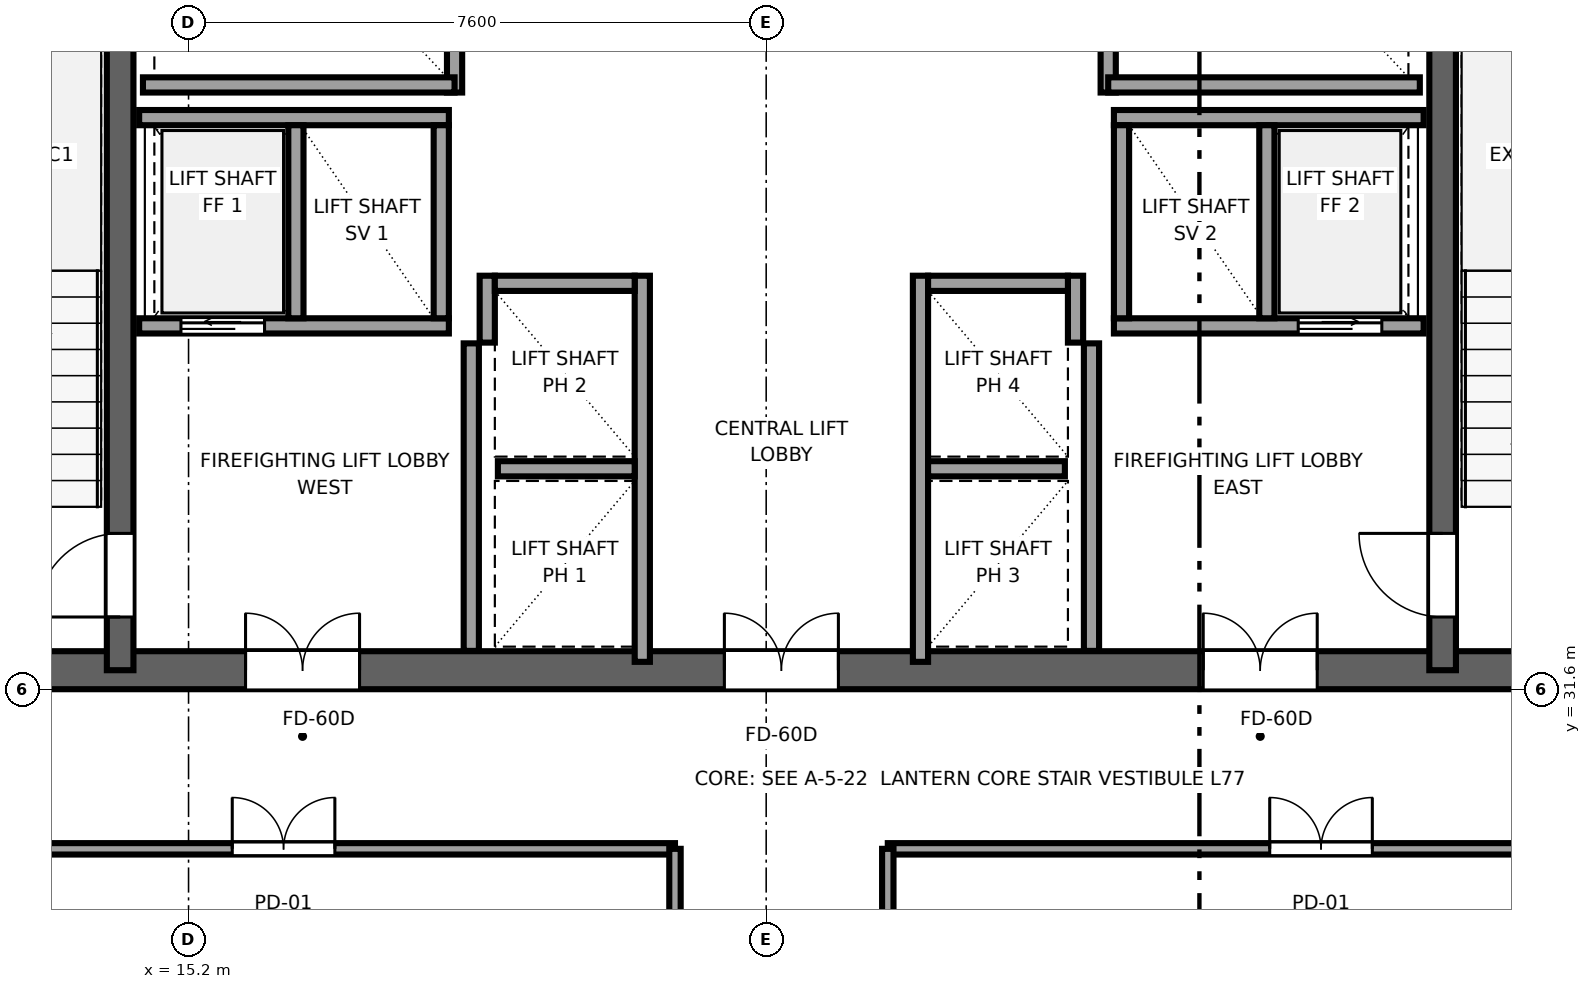
"""IFC4 building model, lengths in metres.
Left out: names, types, materials, properties, quantities, classifications, styles, units other than length and angle.
Written with IfcOpenShell. Run it as: python <this file> out.ifc"""

import sys

from ifc_helpers import new_model, si_unit, direction, frame, frame_2d, origin, place, context, subcontext, project, spatial, rectangle, extrude, source, transform, mapped, element, fill, save


model = new_model("IFC4")
c1 = context("Model", 3, precision=1e-05, world=origin(), true_north=direction((0.0, 1.0)))
c2 = subcontext(c1, "Body", "Model", "MODEL_VIEW")
j1 = project(units=[si_unit("LENGTHUNIT", "METRE"), si_unit("PLANEANGLEUNIT", "RADIAN")], contexts=[c1])
p1 = place(None, origin())
s1 = spatial("IfcSite", under=j1, at=p1, CompositionType="ELEMENT")
p2 = place(p1, origin())
s2 = spatial("IfcBuilding", under=s1, at=p2, CompositionType="ELEMENT")
p3 = place(p2, frame((0.0, 0.0, 290.95)))
s3 = spatial("IfcBuildingStorey", under=s2, at=p3, CompositionType="ELEMENT", Elevation=290.95)
p4 = place(p3, frame((10.0, 31.85, 0.0), z_axis=(0.0, 0.0, 1.0), x_axis=(1.0, 0.0, 0.0)))
e1 = element("IfcWall", 1, at=p4, inside=s3, PredefinedType="SHEAR", context=c2, shape_type="SweptSolid", body=[
    extrude(rectangle(XDim=26.0, YDim=0.5, at=frame_2d((13.0, 0.0))), origin(), (0.0, 0.0, 1.0), 3.8),
])
p5 = place(p4, frame((7.45, 0.0, 0.0), z_axis=(0.0, 0.0, 1.0), x_axis=(-1.0, 0.0, 0.0)))
e2 = element("IfcOpeningElement", 2, at=p5, cuts=e1, PredefinedType="OPENING", context=c2, shape_type="SweptSolid", body=[
    extrude(rectangle(XDim=1.5, YDim=2.04, at=frame_2d((0.75, 1.02))), frame((0.0, 0.26, 0.0), z_axis=(0.0, -1.0, 0.0), x_axis=(1.0, 0.0, 0.0)), (0.0, 0.0, 1.0), 0.52),
])
p6 = place(p4, frame((13.75, 0.0, 0.0), z_axis=(0.0, 0.0, 1.0), x_axis=(-1.0, 0.0, 0.0)))
e3 = element("IfcOpeningElement", 3, at=p6, cuts=e1, PredefinedType="OPENING", context=c2, shape_type="SweptSolid", body=[
    extrude(rectangle(XDim=1.5, YDim=2.04, at=frame_2d((0.75, 1.02))), frame((0.0, 0.26, 0.0), z_axis=(0.0, -1.0, 0.0), x_axis=(1.0, 0.0, 0.0)), (0.0, 0.0, 1.0), 0.52),
])
p7 = place(p4, frame((20.05, 0.0, 0.0), z_axis=(0.0, 0.0, 1.0), x_axis=(-1.0, 0.0, 0.0)))
e4 = element("IfcOpeningElement", 4, at=p7, cuts=e1, PredefinedType="OPENING", context=c2, shape_type="SweptSolid", body=[
    extrude(rectangle(XDim=1.5, YDim=2.04, at=frame_2d((0.75, 1.02))), frame((0.0, 0.26, 0.0), z_axis=(0.0, -1.0, 0.0), x_axis=(1.0, 0.0, 0.0)), (0.0, 0.0, 1.0), 0.52),
])
p8 = place(p3, frame((14.3, 31.85, 0.0), z_axis=(0.0, 0.0, 1.0), x_axis=(0.0, 1.0, 0.0)))
e5 = element("IfcWall", 5, at=p8, inside=s3, PredefinedType="SHEAR", context=c2, shape_type="SweptSolid", body=[
    extrude(rectangle(XDim=12.1, YDim=0.35, at=frame_2d((6.05, 0.0))), origin(), (0.0, 0.0, 1.0), 3.8),
])
p9 = place(p8, frame((0.7, 0.0, 0.0)))
e6 = element("IfcOpeningElement", 6, at=p9, cuts=e5, PredefinedType="OPENING", context=c2, shape_type="SweptSolid", body=[
    extrude(rectangle(XDim=1.1, YDim=2.12, at=frame_2d((0.55, 1.06))), frame((0.0, 0.185, 0.0), z_axis=(0.0, -1.0, 0.0), x_axis=(1.0, 0.0, 0.0)), (0.0, 0.0, 1.0), 0.37),
])
p10 = place(p3, frame((31.7, 31.85, 0.0), z_axis=(0.0, 0.0, 1.0), x_axis=(0.0, 1.0, 0.0)))
e7 = element("IfcWall", 7, at=p10, inside=s3, PredefinedType="SHEAR", context=c2, shape_type="SweptSolid", body=[
    extrude(rectangle(XDim=12.1, YDim=0.35, at=frame_2d((6.05, 0.0))), origin(), (0.0, 0.0, 1.0), 3.8),
])
p11 = place(p10, frame((1.8, 0.0, 0.0), z_axis=(0.0, 0.0, 1.0), x_axis=(-1.0, 0.0, 0.0)))
e8 = element("IfcOpeningElement", 8, at=p11, cuts=e7, PredefinedType="OPENING", context=c2, shape_type="SweptSolid", body=[
    extrude(rectangle(XDim=1.1, YDim=2.12, at=frame_2d((0.55, 1.06))), frame((0.0, 0.185, 0.0), z_axis=(0.0, -1.0, 0.0), x_axis=(1.0, 0.0, 0.0)), (0.0, 0.0, 1.0), 0.37),
])
p12 = place(p3, frame((18.7, 39.45, 0.0), z_axis=(0.0, 0.0, 1.0), x_axis=(0.0, 1.0, 0.0)))
e9 = element("IfcWall", 9, at=p12, inside=s3, PredefinedType="SOLIDWALL", context=c2, shape_type="SweptSolid", body=[
    extrude(rectangle(XDim=4.4, YDim=0.2, at=frame_2d((2.2, 0.0))), origin(), (0.0, 0.0, 1.0), 3.58),
])
p13 = place(p3, frame((14.6, 39.55, 0.0), z_axis=(0.0, 0.0, 1.0), x_axis=(1.0, 0.0, 0.0)))
e10 = element("IfcWall", 10, at=p13, inside=s3, PredefinedType="SOLIDWALL", context=c2, shape_type="SweptSolid", body=[
    extrude(rectangle(XDim=4.1, YDim=0.2, at=frame_2d((2.05, 0.0))), origin(), (0.0, 0.0, 1.0), 3.58),
])
p14 = place(p3, frame((27.3, 39.45, 0.0), z_axis=(0.0, 0.0, 1.0), x_axis=(0.0, 1.0, 0.0)))
e11 = element("IfcWall", 11, at=p14, inside=s3, PredefinedType="SOLIDWALL", context=c2, shape_type="SweptSolid", body=[
    extrude(rectangle(XDim=4.4, YDim=0.2, at=frame_2d((2.2, 0.0))), origin(), (0.0, 0.0, 1.0), 3.58),
])
p15 = place(p3, frame((27.3, 39.55, 0.0), z_axis=(0.0, 0.0, 1.0), x_axis=(1.0, 0.0, 0.0)))
e12 = element("IfcWall", 12, at=p15, inside=s3, PredefinedType="SOLIDWALL", context=c2, shape_type="SweptSolid", body=[
    extrude(rectangle(XDim=4.1, YDim=0.2, at=frame_2d((2.05, 0.0))), origin(), (0.0, 0.0, 1.0), 3.58),
])
for number, where, z_axis, x_axis in (
    (13, (18.92, 32.104, 0.0), (0.0, 0.0, 1.0), (0.0, 1.0, 0.0)),
    (14, (27.08, 32.104, 0.0), (0.0, 0.0, 1.0), (0.0, 1.0, 0.0)),
):
    element("IfcWall", number, at=place(p3, frame(where, z_axis=z_axis, x_axis=x_axis)), inside=s3, PredefinedType="SOLIDWALL", context=c2, shape_type="SweptSolid", body=[
        extrude(rectangle(XDim=4.046, YDim=0.2, at=frame_2d((2.023, 0.0))), origin(), (0.0, 0.0, 1.0), 3.58),
    ])
p16 = place(p3, frame((21.17, 31.96, 0.0), z_axis=(0.0, 0.0, 1.0), x_axis=(0.0, 1.0, 0.0)))
e15 = element("IfcWall", 15, at=p16, inside=s3, PredefinedType="SOLIDWALL", context=c2, shape_type="SweptSolid", body=[
    extrude(rectangle(XDim=5.08, YDim=0.2, at=frame_2d((2.54, 0.0))), origin(), (0.0, 0.0, 1.0), 3.58),
])
p17 = place(p3, frame((19.13, 36.16, 0.0), z_axis=(0.0, 0.0, 1.0), x_axis=(0.0, 1.0, 0.0)))
e16 = element("IfcWall", 16, at=p17, inside=s3, PredefinedType="SOLIDWALL", context=c2, shape_type="SweptSolid", body=[
    extrude(rectangle(XDim=0.88, YDim=0.2, at=frame_2d((0.44, 0.0))), origin(), (0.0, 0.0, 1.0), 3.58),
])
p18 = place(p3, frame((19.23, 36.94, 0.0), z_axis=(0.0, 0.0, 1.0), x_axis=(1.0, 0.0, 0.0)))
e17 = element("IfcWall", 17, at=p18, inside=s3, PredefinedType="SOLIDWALL", context=c2, shape_type="SweptSolid", body=[
    extrude(rectangle(XDim=1.84, YDim=0.2, at=frame_2d((0.92, 0.0))), origin(), (0.0, 0.0, 1.0), 3.58),
])
p19 = place(p3, frame((19.27, 34.5, 0.0), z_axis=(0.0, 0.0, 1.0), x_axis=(1.0, 0.0, 0.0)))
e18 = element("IfcWall", 18, at=p19, inside=s3, PredefinedType="SOLIDWALL", context=c2, shape_type="SweptSolid", body=[
    extrude(rectangle(XDim=1.8, YDim=0.2, at=frame_2d((0.9, 0.0))), origin(), (0.0, 0.0, 1.0), 3.58),
])
p20 = place(p3, frame((27.375, 36.38, 0.0), z_axis=(0.0, 0.0, 1.0), x_axis=(1.0, 0.0, 0.0)))
e19 = element("IfcWall", 19, at=p20, inside=s3, PredefinedType="SOLIDWALL", context=c2, shape_type="SweptSolid", body=[
    extrude(rectangle(XDim=4.075, YDim=0.2, at=frame_2d((2.038, 0.0))), origin(), (0.0, 0.0, 1.0), 3.58),
])
p21 = place(p20, frame((2.425, 0.0, 0.0)))
e20 = element("IfcOpeningElement", 20, at=p21, cuts=e19, PredefinedType="OPENING", context=c2, shape_type="SweptSolid", body=[
    extrude(rectangle(XDim=1.1, YDim=2.12, at=frame_2d((0.55, 1.06))), frame((0.0, 0.11, 0.0), z_axis=(0.0, -1.0, 0.0), x_axis=(1.0, 0.0, 0.0)), (0.0, 0.0, 1.0), 0.22),
])
p22 = place(p3, frame((27.375, 39.12, 0.0), z_axis=(0.0, 0.0, 1.0), x_axis=(1.0, 0.0, 0.0)))
e21 = element("IfcWall", 21, at=p22, inside=s3, PredefinedType="SOLIDWALL", context=c2, shape_type="SweptSolid", body=[
    extrude(rectangle(XDim=4.075, YDim=0.2, at=frame_2d((2.038, 0.0))), origin(), (0.0, 0.0, 1.0), 3.58),
])
for number, where, z_axis, x_axis in (
    (22, (27.475, 36.48, 0.0), (0.0, 0.0, 1.0), (0.0, 1.0, 0.0)),
    (23, (29.387, 36.48, 0.0), (0.0, 0.0, 1.0), (0.0, 1.0, 0.0)),
):
    element("IfcWall", number, at=place(p3, frame(where, z_axis=z_axis, x_axis=x_axis)), inside=s3, PredefinedType="SOLIDWALL", context=c2, shape_type="SweptSolid", body=[
        extrude(rectangle(XDim=2.54, YDim=0.2, at=frame_2d((1.27, 0.0))), origin(), (0.0, 0.0, 1.0), 3.58),
    ])
p23 = place(p3, frame((14.55, 36.38, 0.0), z_axis=(0.0, 0.0, 1.0), x_axis=(1.0, 0.0, 0.0)))
e24 = element("IfcWall", 24, at=p23, inside=s3, PredefinedType="SOLIDWALL", context=c2, shape_type="SweptSolid", body=[
    extrude(rectangle(XDim=4.075, YDim=0.2, at=frame_2d((2.038, 0.0))), origin(), (0.0, 0.0, 1.0), 3.58),
])
p24 = place(p23, frame((0.55, 0.0, 0.0)))
e25 = element("IfcOpeningElement", 25, at=p24, cuts=e24, PredefinedType="OPENING", context=c2, shape_type="SweptSolid", body=[
    extrude(rectangle(XDim=1.1, YDim=2.12, at=frame_2d((0.55, 1.06))), frame((0.0, 0.11, 0.0), z_axis=(0.0, -1.0, 0.0), x_axis=(1.0, 0.0, 0.0)), (0.0, 0.0, 1.0), 0.22),
])
p25 = place(p3, frame((14.55, 39.12, 0.0), z_axis=(0.0, 0.0, 1.0), x_axis=(1.0, 0.0, 0.0)))
e26 = element("IfcWall", 26, at=p25, inside=s3, PredefinedType="SOLIDWALL", context=c2, shape_type="SweptSolid", body=[
    extrude(rectangle(XDim=4.075, YDim=0.2, at=frame_2d((2.038, 0.0))), origin(), (0.0, 0.0, 1.0), 3.58),
])
for number, where, z_axis, x_axis in (
    (27, (18.525, 36.48, 0.0), (0.0, 0.0, 1.0), (0.0, 1.0, 0.0)),
    (28, (16.613, 36.48, 0.0), (0.0, 0.0, 1.0), (0.0, 1.0, 0.0)),
):
    element("IfcWall", number, at=place(p3, frame(where, z_axis=z_axis, x_axis=x_axis)), inside=s3, PredefinedType="SOLIDWALL", context=c2, shape_type="SweptSolid", body=[
        extrude(rectangle(XDim=2.54, YDim=0.2, at=frame_2d((1.27, 0.0))), origin(), (0.0, 0.0, 1.0), 3.58),
    ])
p26 = place(p3, frame((24.83, 31.96, 0.0), z_axis=(0.0, 0.0, 1.0), x_axis=(0.0, 1.0, 0.0)))
e29 = element("IfcWall", 29, at=p26, inside=s3, PredefinedType="SOLIDWALL", context=c2, shape_type="SweptSolid", body=[
    extrude(rectangle(XDim=5.08, YDim=0.2, at=frame_2d((2.54, 0.0))), origin(), (0.0, 0.0, 1.0), 3.58),
])
p27 = place(p3, frame((26.87, 36.16, 0.0), z_axis=(0.0, 0.0, 1.0), x_axis=(0.0, 1.0, 0.0)))
e30 = element("IfcWall", 30, at=p27, inside=s3, PredefinedType="SOLIDWALL", context=c2, shape_type="SweptSolid", body=[
    extrude(rectangle(XDim=0.88, YDim=0.2, at=frame_2d((0.44, 0.0))), origin(), (0.0, 0.0, 1.0), 3.58),
])
p28 = place(p3, frame((24.93, 36.94, 0.0), z_axis=(0.0, 0.0, 1.0), x_axis=(1.0, 0.0, 0.0)))
e31 = element("IfcWall", 31, at=p28, inside=s3, PredefinedType="SOLIDWALL", context=c2, shape_type="SweptSolid", body=[
    extrude(rectangle(XDim=1.84, YDim=0.2, at=frame_2d((0.92, 0.0))), origin(), (0.0, 0.0, 1.0), 3.58),
])
p29 = place(p3, frame((24.93, 34.5, 0.0), z_axis=(0.0, 0.0, 1.0), x_axis=(1.0, 0.0, 0.0)))
e32 = element("IfcWall", 32, at=p29, inside=s3, PredefinedType="SOLIDWALL", context=c2, shape_type="SweptSolid", body=[
    extrude(rectangle(XDim=1.8, YDim=0.2, at=frame_2d((0.9, 0.0))), origin(), (0.0, 0.0, 1.0), 3.58),
])
p30 = place(p3, frame((11.3, 29.5, 0.0), z_axis=(0.0, 0.0, 1.0), x_axis=(1.0, 0.0, 0.0)))
e33 = element("IfcWall", 33, at=p30, inside=s3, PredefinedType="PARTITIONING", context=c2, shape_type="SweptSolid", body=[
    extrude(rectangle(XDim=10.3, YDim=0.15, at=frame_2d((5.15, 0.0))), origin(), (0.0, 0.0, 1.0), 3.58),
])
p31 = place(p30, frame((4.475, 0.0, 0.0)))
e34 = element("IfcOpeningElement", 34, at=p31, cuts=e33, PredefinedType="OPENING", context=c2, shape_type="SweptSolid", body=[
    extrude(rectangle(XDim=1.35, YDim=2.15, at=frame_2d((0.675, 1.075))), frame((0.0, 0.085, 0.0), z_axis=(0.0, -1.0, 0.0), x_axis=(1.0, 0.0, 0.0)), (0.0, 0.0, 1.0), 0.17),
])
p32 = place(p3, frame((21.6, 25.0, 0.0), z_axis=(0.0, 0.0, 1.0), x_axis=(0.0, 1.0, 0.0)))
e35 = element("IfcWall", 35, at=p32, inside=s3, PredefinedType="PARTITIONING", context=c2, shape_type="SweptSolid", body=[
    extrude(rectangle(XDim=4.5, YDim=0.15, at=frame_2d((2.25, 0.0))), origin(), (0.0, 0.0, 1.0), 3.58),
])
p33 = place(p3, frame((24.4, 29.5, 0.0), z_axis=(0.0, 0.0, 1.0), x_axis=(1.0, 0.0, 0.0)))
e36 = element("IfcWall", 36, at=p33, inside=s3, PredefinedType="PARTITIONING", context=c2, shape_type="SweptSolid", body=[
    extrude(rectangle(XDim=11.4, YDim=0.15, at=frame_2d((5.7, 0.0))), origin(), (0.0, 0.0, 1.0), 3.58),
])
p34 = place(p33, frame((5.025, 0.0, 0.0)))
e37 = element("IfcOpeningElement", 37, at=p34, cuts=e36, PredefinedType="OPENING", context=c2, shape_type="SweptSolid", body=[
    extrude(rectangle(XDim=1.35, YDim=2.15, at=frame_2d((0.675, 1.075))), frame((0.0, 0.085, 0.0), z_axis=(0.0, -1.0, 0.0), x_axis=(1.0, 0.0, 0.0)), (0.0, 0.0, 1.0), 0.17),
])
p35 = place(p3, frame((24.4, 25.0, 0.0), z_axis=(0.0, 0.0, 1.0), x_axis=(0.0, 1.0, 0.0)))
e38 = element("IfcWall", 38, at=p35, inside=s3, PredefinedType="PARTITIONING", context=c2, shape_type="SweptSolid", body=[
    extrude(rectangle(XDim=4.5, YDim=0.15, at=frame_2d((2.25, 0.0))), origin(), (0.0, 0.0, 1.0), 3.58),
])
m1 = source(origin(), c2, "Body", "SweptSolid", [
    extrude(rectangle(XDim=1.1, YDim=2.12, at=frame_2d((0.55, 1.06))), frame((0.0, 0.025, 0.0), z_axis=(0.0, -1.0, 0.0), x_axis=(1.0, 0.0, 0.0)), (0.0, 0.0, 1.0), 0.05),
])
p36 = place(p9, origin())
e39 = element("IfcDoor", 39, at=p36, inside=s3, OperationType="SINGLE_SWING_LEFT", PredefinedType="DOOR", context=c2, shape_type="MappedRepresentation", body=[
    mapped(m1, transform((0.0, 0.0, 0.0), x_axis=(1.0, 0.0, 0.0), y_axis=(0.0, 1.0, 0.0), z_axis=(0.0, 0.0, 1.0), scale=1.0)),
])
fill(e6, e39)
p37 = place(p11, origin())
e40 = element("IfcDoor", 40, at=p37, inside=s3, OperationType="SINGLE_SWING_RIGHT", PredefinedType="DOOR", context=c2, shape_type="MappedRepresentation", body=[
    mapped(m1, transform((0.0, 0.0, 0.0), x_axis=(1.0, 0.0, 0.0), y_axis=(0.0, 1.0, 0.0), z_axis=(0.0, 0.0, 1.0), scale=1.0)),
])
fill(e8, e40)
m2 = source(origin(), c2, "Body", "SweptSolid", [
    extrude(rectangle(XDim=1.5, YDim=2.04, at=frame_2d((0.75, 1.02))), frame((0.0, 0.025, 0.0), z_axis=(0.0, -1.0, 0.0), x_axis=(1.0, 0.0, 0.0)), (0.0, 0.0, 1.0), 0.05),
])
p38 = place(p5, origin())
e41 = element("IfcDoor", 41, at=p38, inside=s3, OperationType="DOUBLE_DOOR_SINGLE_SWING", PredefinedType="DOOR", context=c2, shape_type="MappedRepresentation", body=[
    mapped(m2, transform((0.0, 0.0, 0.0), x_axis=(1.0, 0.0, 0.0), y_axis=(0.0, 1.0, 0.0), z_axis=(0.0, 0.0, 1.0), scale=1.0)),
])
fill(e2, e41)
p39 = place(p6, origin())
e42 = element("IfcDoor", 42, at=p39, inside=s3, OperationType="DOUBLE_DOOR_SINGLE_SWING", PredefinedType="DOOR", context=c2, shape_type="MappedRepresentation", body=[
    mapped(m2, transform((0.0, 0.0, 0.0), x_axis=(1.0, 0.0, 0.0), y_axis=(0.0, 1.0, 0.0), z_axis=(0.0, 0.0, 1.0), scale=1.0)),
])
fill(e3, e42)
p40 = place(p7, origin())
e43 = element("IfcDoor", 43, at=p40, inside=s3, OperationType="DOUBLE_DOOR_SINGLE_SWING", PredefinedType="DOOR", context=c2, shape_type="MappedRepresentation", body=[
    mapped(m2, transform((0.0, 0.0, 0.0), x_axis=(1.0, 0.0, 0.0), y_axis=(0.0, 1.0, 0.0), z_axis=(0.0, 0.0, 1.0), scale=1.0)),
])
fill(e4, e43)
m3 = source(origin(), c2, "Body", "SweptSolid", [
    extrude(rectangle(XDim=1.1, YDim=2.12, at=frame_2d((0.55, 1.06))), frame((0.0, 0.025, 0.0), z_axis=(0.0, -1.0, 0.0), x_axis=(1.0, 0.0, 0.0)), (0.0, 0.0, 1.0), 0.05),
])
p41 = place(p21, origin())
e44 = element("IfcDoor", 44, at=p41, inside=s3, OperationType="SLIDING_TO_RIGHT", PredefinedType="DOOR", context=c2, shape_type="MappedRepresentation", body=[
    mapped(m3, transform((0.0, 0.0, 0.0), x_axis=(1.0, 0.0, 0.0), y_axis=(0.0, 1.0, 0.0), z_axis=(0.0, 0.0, 1.0), scale=1.0)),
])
fill(e20, e44)
p42 = place(p24, origin())
e45 = element("IfcDoor", 45, at=p42, inside=s3, OperationType="SLIDING_TO_LEFT", PredefinedType="DOOR", context=c2, shape_type="MappedRepresentation", body=[
    mapped(m3, transform((0.0, 0.0, 0.0), x_axis=(1.0, 0.0, 0.0), y_axis=(0.0, 1.0, 0.0), z_axis=(0.0, 0.0, 1.0), scale=1.0)),
])
fill(e25, e45)
m4 = source(origin(), c2, "Body", "SweptSolid", [
    extrude(rectangle(XDim=1.35, YDim=2.15, at=frame_2d((0.675, 1.075))), frame((0.0, 0.025, 0.0), z_axis=(0.0, -1.0, 0.0), x_axis=(1.0, 0.0, 0.0)), (0.0, 0.0, 1.0), 0.05),
])
p43 = place(p31, origin())
e46 = element("IfcDoor", 46, at=p43, inside=s3, OperationType="DOUBLE_DOOR_SINGLE_SWING", PredefinedType="DOOR", context=c2, shape_type="MappedRepresentation", body=[
    mapped(m4, transform((0.0, 0.0, 0.0), x_axis=(1.0, 0.0, 0.0), y_axis=(0.0, 1.0, 0.0), z_axis=(0.0, 0.0, 1.0), scale=1.0)),
])
fill(e34, e46)
p44 = place(p34, origin())
e47 = element("IfcDoor", 47, at=p44, inside=s3, OperationType="DOUBLE_DOOR_SINGLE_SWING", PredefinedType="DOOR", context=c2, shape_type="MappedRepresentation", body=[
    mapped(m4, transform((0.0, 0.0, 0.0), x_axis=(1.0, 0.0, 0.0), y_axis=(0.0, 1.0, 0.0), z_axis=(0.0, 0.0, 1.0), scale=1.0)),
])
fill(e37, e47)
save(model, sys.argv[1])
